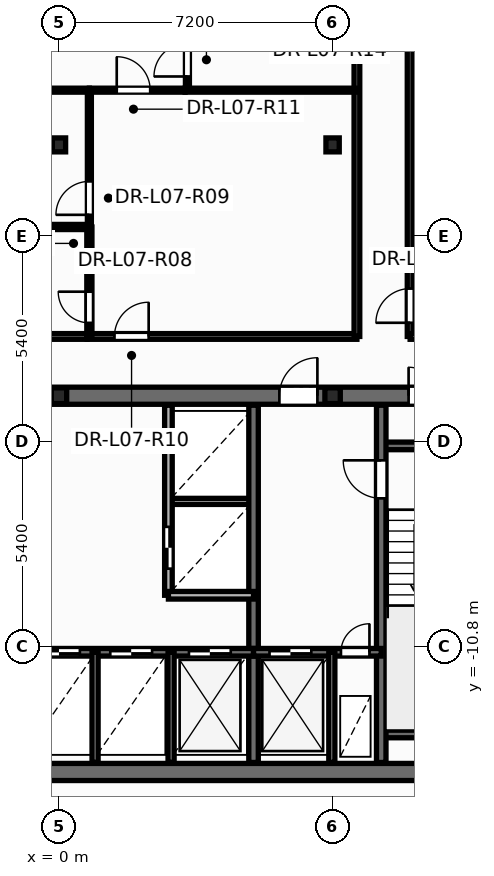
"""IFC4 building model, lengths in metres.
Left out: names, types, materials, properties, quantities, classifications, styles, units other than length and angle.
Written with IfcOpenShell. Run it as: python <this file> out.ifc"""

import sys

from ifc_helpers import new_model, si_unit, direction, frame, frame_2d, origin, origin_2d, place, context, subcontext, project, spatial, rectangle, i_section, extrude, element, fill, save


model = new_model("IFC4")
c1 = context("Model", 3, precision=1e-05, world=origin(), true_north=direction((0.0, 1.0)))
c2 = subcontext(c1, "Body", "Model", "MODEL_VIEW")
j1 = project(units=[si_unit("LENGTHUNIT", "METRE"), si_unit("PLANEANGLEUNIT", "RADIAN")], contexts=[c1])
p1 = place(None, origin())
s1 = spatial("IfcSite", under=j1, at=p1, CompositionType="ELEMENT")
p2 = place(p1, origin())
s2 = spatial("IfcBuilding", under=s1, at=p2, CompositionType="ELEMENT")
p3 = place(p2, frame((0.0, 0.0, 31.5)))
s3 = spatial("IfcBuildingStorey", under=s2, at=p3, CompositionType="ELEMENT", Elevation=31.5)
for number, where, z_axis, x_axis in (
    (1, (0.0, -4.2, 0.0), (0.0, 0.0, 1.0), (1.0, 0.0, 0.0)),
    (2, (7.2, -4.2, 0.0), (0.0, 0.0, 1.0), (1.0, 0.0, 0.0)),
):
    element("IfcColumn", number, at=place(p3, frame(where, z_axis=z_axis, x_axis=x_axis)), inside=s3, PredefinedType="PILASTER", context=c2, shape_type="SweptSolid", body=[
        extrude(i_section(OverallWidth=0.405, OverallDepth=0.414, WebThickness=0.022, FlangeThickness=0.032, at=origin_2d()), origin(), (0.0, 0.0, 1.0), 3.6),
    ])
for number, where, z_axis, x_axis in (
    (3, (0.0, 2.4, 0.0), (0.0, 0.0, 1.0), (1.0, 0.0, 0.0)),
    (4, (7.2, 2.4, 0.0), (0.0, 0.0, 1.0), (1.0, 0.0, 0.0)),
):
    element("IfcColumn", number, at=place(p3, frame(where, z_axis=z_axis, x_axis=x_axis)), inside=s3, PredefinedType="COLUMN", context=c2, shape_type="SweptSolid", body=[
        extrude(i_section(OverallWidth=0.35, OverallDepth=0.367, WebThickness=0.025, FlangeThickness=0.032, at=origin_2d()), origin(), (0.0, 0.0, 1.0), 3.6),
    ])
p4 = place(p3, frame((2.88, -6.98, 0.0), z_axis=(0.0, 0.0, 1.0), x_axis=(1.0, 0.0, 0.0)))
e5 = element("IfcWall", 5, at=p4, inside=s3, PredefinedType="PARTITIONING", context=c2, shape_type="SweptSolid", body=[
    extrude(rectangle(XDim=2.24, YDim=0.16, at=frame_2d((1.12, 0.0))), origin(), (0.0, 0.0, 1.0), 3.35),
])
p5 = place(p3, frame((-12.65, -14.1, 0.0), z_axis=(0.0, 0.0, 1.0), x_axis=(1.0, 0.0, 0.0)))
e6 = element("IfcWall", 6, at=p5, inside=s3, PredefinedType="SHEAR", context=c2, shape_type="SweptSolid", body=[
    extrude(rectangle(XDim=25.3, YDim=0.45, at=frame_2d((12.65, 0.0))), origin(), (0.0, 0.0, 1.0), 3.6),
])
p6 = place(p3, frame((-12.65, -4.2, 0.0), z_axis=(0.0, 0.0, 1.0), x_axis=(1.0, 0.0, 0.0)))
e7 = element("IfcWall", 7, at=p6, inside=s3, PredefinedType="SHEAR", context=c2, shape_type="SweptSolid", body=[
    extrude(rectangle(XDim=25.3, YDim=0.45, at=frame_2d((12.65, 0.0))), origin(), (0.0, 0.0, 1.0), 3.6),
])
p7 = place(p6, frame((1.85, 0.0, 0.0)))
e8 = element("IfcOpeningElement", 8, at=p7, cuts=e7, PredefinedType="OPENING", context=c2, shape_type="SweptSolid", body=[
    extrude(rectangle(XDim=0.756, YDim=2.054, at=frame_2d((0.375, 1.027))), frame((0.0, 0.235, 0.0), z_axis=(0.0, -1.0, 0.0), x_axis=(1.0, 0.0, 0.0)), (0.0, 0.0, 1.0), 0.47),
])
p8 = place(p6, frame((21.85, 0.0, 0.0)))
e9 = element("IfcOpeningElement", 9, at=p8, cuts=e7, PredefinedType="OPENING", context=c2, shape_type="SweptSolid", body=[
    extrude(rectangle(XDim=0.756, YDim=2.054, at=frame_2d((0.375, 1.027))), frame((0.0, 0.235, 0.0), z_axis=(0.0, -1.0, 0.0), x_axis=(1.0, 0.0, 0.0)), (0.0, 0.0, 1.0), 0.47),
])
p9 = place(p6, frame((23.5, 0.0, 0.0)))
e10 = element("IfcOpeningElement", 10, at=p9, cuts=e7, PredefinedType="OPENING", context=c2, shape_type="SweptSolid", body=[
    extrude(rectangle(XDim=0.756, YDim=2.054, at=frame_2d((0.375, 1.027))), frame((0.0, 0.235, 0.0), z_axis=(0.0, -1.0, 0.0), x_axis=(1.0, 0.0, 0.0)), (0.0, 0.0, 1.0), 0.47),
])
p10 = place(p6, frame((5.85, 0.0, 0.0)))
e11 = element("IfcOpeningElement", 11, at=p10, cuts=e7, PredefinedType="OPENING", context=c2, shape_type="SweptSolid", body=[
    extrude(rectangle(XDim=1.006, YDim=2.104, at=frame_2d((0.5, 1.052))), frame((0.0, 0.235, 0.0), z_axis=(0.0, -1.0, 0.0), x_axis=(1.0, 0.0, 0.0)), (0.0, 0.0, 1.0), 0.47),
])
p11 = place(p6, frame((10.35, 0.0, 0.0)))
e12 = element("IfcOpeningElement", 12, at=p11, cuts=e7, PredefinedType="OPENING", context=c2, shape_type="SweptSolid", body=[
    extrude(rectangle(XDim=1.406, YDim=2.154, at=frame_2d((0.7, 1.077))), frame((0.0, 0.235, 0.0), z_axis=(0.0, -1.0, 0.0), x_axis=(1.0, 0.0, 0.0)), (0.0, 0.0, 1.0), 0.47),
])
p12 = place(p6, frame((18.45, 0.0, 0.0)))
e13 = element("IfcOpeningElement", 13, at=p12, cuts=e7, PredefinedType="OPENING", context=c2, shape_type="SweptSolid", body=[
    extrude(rectangle(XDim=1.006, YDim=2.104, at=frame_2d((0.5, 1.052))), frame((0.0, 0.235, 0.0), z_axis=(0.0, -1.0, 0.0), x_axis=(1.0, 0.0, 0.0)), (0.0, 0.0, 1.0), 0.47),
])
for number, where, z_axis, x_axis in (
    (14, (8.48, -5.52, 0.0), (0.0, 0.0, 1.0), (1.0, 0.0, 0.0)),
    (15, (8.48, -13.1, 0.0), (0.0, 0.0, 1.0), (1.0, 0.0, 0.0)),
):
    element("IfcWall", number, at=place(p3, frame(where, z_axis=z_axis, x_axis=x_axis)), inside=s3, PredefinedType="SOLIDWALL", context=c2, shape_type="SweptSolid", body=[
        extrude(rectangle(XDim=3.87, YDim=0.2, at=frame_2d((1.935, 0.0))), origin(), (0.0, 0.0, 1.0), 3.6),
    ])
p13 = place(p3, frame((8.48, -13.85, 0.0), z_axis=(0.0, 0.0, 1.0), x_axis=(0.0, 1.0, 0.0)))
e16 = element("IfcWall", 16, at=p13, inside=s3, PredefinedType="SHEAR", context=c2, shape_type="SweptSolid", body=[
    extrude(rectangle(XDim=9.4, YDim=0.25, at=frame_2d((4.7, 0.0))), origin(), (0.0, 0.0, 1.0), 3.6),
])
p14 = place(p13, frame((6.95, 0.0, 0.0)))
e17 = element("IfcOpeningElement", 17, at=p14, cuts=e16, PredefinedType="OPENING", context=c2, shape_type="SweptSolid", body=[
    extrude(rectangle(XDim=1.006, YDim=2.104, at=frame_2d((0.5, 1.052))), frame((0.0, 0.135, 0.0), z_axis=(0.0, -1.0, 0.0), x_axis=(1.0, 0.0, 0.0)), (0.0, 0.0, 1.0), 0.27),
])
p15 = place(p3, frame((5.12, -13.85, 0.0), z_axis=(0.0, 0.0, 1.0), x_axis=(0.0, 1.0, 0.0)))
e18 = element("IfcWall", 18, at=p15, inside=s3, PredefinedType="SHEAR", context=c2, shape_type="SweptSolid", body=[
    extrude(rectangle(XDim=9.4, YDim=0.25, at=frame_2d((4.7, 0.0))), origin(), (0.0, 0.0, 1.0), 3.6),
])
p16 = place(p3, frame((-5.12, -10.95, 0.0), z_axis=(0.0, 0.0, 1.0), x_axis=(1.0, 0.0, 0.0)))
e19 = element("IfcWall", 19, at=p16, inside=s3, PredefinedType="SOLIDWALL", context=c2, shape_type="SweptSolid", body=[
    extrude(rectangle(XDim=10.24, YDim=0.2, at=frame_2d((5.12, 0.0))), origin(), (0.0, 0.0, 1.0), 3.6),
])
p17 = place(p16, frame((0.6, 0.0, 0.0)))
e20 = element("IfcOpeningElement", 20, at=p17, cuts=e19, PredefinedType="OPENING", context=c2, shape_type="SweptSolid", body=[
    extrude(rectangle(XDim=1.106, YDim=2.104, at=frame_2d((0.55, 1.052))), frame((0.0, 0.11, 0.0), z_axis=(0.0, -1.0, 0.0), x_axis=(1.0, 0.0, 0.0)), (0.0, 0.0, 1.0), 0.22),
])
p18 = place(p16, frame((2.67, 0.0, 0.0)))
e21 = element("IfcOpeningElement", 21, at=p18, cuts=e19, PredefinedType="OPENING", context=c2, shape_type="SweptSolid", body=[
    extrude(rectangle(XDim=1.106, YDim=2.104, at=frame_2d((0.55, 1.052))), frame((0.0, 0.11, 0.0), z_axis=(0.0, -1.0, 0.0), x_axis=(1.0, 0.0, 0.0)), (0.0, 0.0, 1.0), 0.22),
])
p19 = place(p16, frame((4.57, 0.0, 0.0)))
e22 = element("IfcOpeningElement", 22, at=p19, cuts=e19, PredefinedType="OPENING", context=c2, shape_type="SweptSolid", body=[
    extrude(rectangle(XDim=1.106, YDim=2.104, at=frame_2d((0.55, 1.052))), frame((0.0, 0.11, 0.0), z_axis=(0.0, -1.0, 0.0), x_axis=(1.0, 0.0, 0.0)), (0.0, 0.0, 1.0), 0.22),
])
p20 = place(p16, frame((6.47, 0.0, 0.0)))
e23 = element("IfcOpeningElement", 23, at=p20, cuts=e19, PredefinedType="OPENING", context=c2, shape_type="SweptSolid", body=[
    extrude(rectangle(XDim=1.106, YDim=2.104, at=frame_2d((0.55, 1.052))), frame((0.0, 0.11, 0.0), z_axis=(0.0, -1.0, 0.0), x_axis=(1.0, 0.0, 0.0)), (0.0, 0.0, 1.0), 0.22),
])
p21 = place(p16, frame((8.54, 0.0, 0.0)))
e24 = element("IfcOpeningElement", 24, at=p21, cuts=e19, PredefinedType="OPENING", context=c2, shape_type="SweptSolid", body=[
    extrude(rectangle(XDim=1.106, YDim=2.104, at=frame_2d((0.55, 1.052))), frame((0.0, 0.11, 0.0), z_axis=(0.0, -1.0, 0.0), x_axis=(1.0, 0.0, 0.0)), (0.0, 0.0, 1.0), 0.22),
])
p22 = place(p3, frame((5.12, -10.95, 0.0), z_axis=(0.0, 0.0, 1.0), x_axis=(1.0, 0.0, 0.0)))
e25 = element("IfcWall", 25, at=p22, inside=s3, PredefinedType="SOLIDWALL", context=c2, shape_type="SweptSolid", body=[
    extrude(rectangle(XDim=3.36, YDim=0.2, at=frame_2d((1.68, 0.0))), origin(), (0.0, 0.0, 1.0), 3.6),
])
p23 = place(p22, frame((0.42, 0.0, 0.0)))
e26 = element("IfcOpeningElement", 26, at=p23, cuts=e25, PredefinedType="OPENING", context=c2, shape_type="SweptSolid", body=[
    extrude(rectangle(XDim=1.106, YDim=2.104, at=frame_2d((0.55, 1.052))), frame((0.0, 0.11, 0.0), z_axis=(0.0, -1.0, 0.0), x_axis=(1.0, 0.0, 0.0)), (0.0, 0.0, 1.0), 0.22),
])
p24 = place(p22, frame((2.3, 0.0, 0.0)))
e27 = element("IfcOpeningElement", 27, at=p24, cuts=e25, PredefinedType="OPENING", context=c2, shape_type="SweptSolid", body=[
    extrude(rectangle(XDim=0.756, YDim=2.054, at=frame_2d((0.375, 1.027))), frame((0.0, 0.11, 0.0), z_axis=(0.0, -1.0, 0.0), x_axis=(1.0, 0.0, 0.0)), (0.0, 0.0, 1.0), 0.22),
])
for number, where, z_axis, x_axis in (
    (28, (7.18, -13.85, 0.0), (0.0, 0.0, 1.0), (0.0, 1.0, 0.0)),
    (29, (2.95, -13.85, 0.0), (0.0, 0.0, 1.0), (0.0, 1.0, 0.0)),
):
    element("IfcWall", number, at=place(p3, frame(where, z_axis=z_axis, x_axis=x_axis)), inside=s3, PredefinedType="PARTITIONING", context=c2, shape_type="SweptSolid", body=[
        extrude(rectangle(XDim=2.9, YDim=0.16, at=frame_2d((1.45, 0.0))), origin(), (0.0, 0.0, 1.0), 2.375),
    ])
p25 = place(p3, frame((2.88, -9.45, 0.0), z_axis=(0.0, 0.0, 1.0), x_axis=(0.0, 1.0, 0.0)))
e30 = element("IfcWall", 30, at=p25, inside=s3, PredefinedType="SOLIDWALL", context=c2, shape_type="SweptSolid", body=[
    extrude(rectangle(XDim=5.0, YDim=0.2, at=frame_2d((2.5, 0.0))), origin(), (0.0, 0.0, 1.0), 3.35),
])
p26 = place(p25, frame((0.7, 0.0, 0.0)))
e31 = element("IfcOpeningElement", 31, at=p26, cuts=e30, PredefinedType="OPENING", context=c2, shape_type="SweptSolid", body=[
    extrude(rectangle(XDim=1.106, YDim=2.104, at=frame_2d((0.55, 1.052))), frame((0.0, 0.11, 0.0), z_axis=(0.0, -1.0, 0.0), x_axis=(1.0, 0.0, 0.0)), (0.0, 0.0, 1.0), 0.22),
])
p27 = place(p3, frame((2.88, -9.45, 0.0), z_axis=(0.0, 0.0, 1.0), x_axis=(1.0, 0.0, 0.0)))
e32 = element("IfcWall", 32, at=p27, inside=s3, PredefinedType="SOLIDWALL", context=c2, shape_type="SweptSolid", body=[
    extrude(rectangle(XDim=2.24, YDim=0.2, at=frame_2d((1.12, 0.0))), origin(), (0.0, 0.0, 1.0), 3.35),
])
p28 = place(p3, frame((0.95, -13.85, 0.0), z_axis=(0.0, 0.0, 1.0), x_axis=(0.0, 1.0, 0.0)))
e33 = element("IfcWall", 33, at=p28, inside=s3, PredefinedType="PARTITIONING", context=c2, shape_type="SweptSolid", body=[
    extrude(rectangle(XDim=2.9, YDim=0.16, at=frame_2d((1.45, 0.0))), origin(), (0.0, 0.0, 1.0), 2.375),
])
p29 = place(p3, frame((9.24, -2.64, 0.0), z_axis=(0.0, 0.0, 1.0), x_axis=(0.0, 1.0, 0.0)))
e34 = element("IfcWall", 34, at=p29, inside=s3, PredefinedType="PARTITIONING", context=c2, shape_type="SweptSolid", body=[
    extrude(rectangle(XDim=8.84, YDim=0.15, at=frame_2d((4.42, 0.0))), origin(), (0.0, 0.0, 1.0), 2.509),
])
p30 = place(p29, frame((0.359, 0.0, 0.0)))
e35 = element("IfcOpeningElement", 35, at=p30, cuts=e34, PredefinedType="OPENING", context=c2, shape_type="SweptSolid", body=[
    extrude(rectangle(XDim=0.906, YDim=2.104, at=frame_2d((0.45, 1.052))), frame((0.0, 0.085, 0.0), z_axis=(0.0, -1.0, 0.0), x_axis=(1.0, 0.0, 0.0)), (0.0, 0.0, 1.0), 0.17),
])
p31 = place(p3, frame((0.74, -2.64, 0.0), z_axis=(0.0, 0.0, 1.0), x_axis=(1.0, 0.0, 0.0)))
e36 = element("IfcWall", 36, at=p31, inside=s3, PredefinedType="PARTITIONING", context=c2, shape_type="SweptSolid", body=[
    extrude(rectangle(XDim=7.1, YDim=0.15, at=frame_2d((3.55, 0.0))), origin(), (0.0, 0.0, 1.0), 2.325),
])
p32 = place(p31, frame((0.72, 0.0, 0.0)))
e37 = element("IfcOpeningElement", 37, at=p32, cuts=e36, PredefinedType="OPENING", context=c2, shape_type="SweptSolid", body=[
    extrude(rectangle(XDim=0.906, YDim=2.104, at=frame_2d((0.45, 1.052))), frame((0.0, 0.085, 0.0), z_axis=(0.0, -1.0, 0.0), x_axis=(1.0, 0.0, 0.0)), (0.0, 0.0, 1.0), 0.17),
])
p33 = place(p3, frame((7.84, -2.64, 0.0), z_axis=(0.0, 0.0, 1.0), x_axis=(0.0, 1.0, 0.0)))
e38 = element("IfcWall", 38, at=p33, inside=s3, PredefinedType="PARTITIONING", context=c2, shape_type="SweptSolid", body=[
    extrude(rectangle(XDim=8.84, YDim=0.15, at=frame_2d((4.42, 0.0))), origin(), (0.0, 0.0, 1.0), 2.509),
])
p34 = place(p3, frame((-7.84, -2.64, 0.0), z_axis=(0.0, 0.0, 1.0), x_axis=(1.0, 0.0, 0.0)))
e39 = element("IfcWall", 39, at=p34, inside=s3, PredefinedType="PARTITIONING", context=c2, shape_type="SweptSolid", body=[
    extrude(rectangle(XDim=8.578, YDim=0.15, at=frame_2d((4.289, 0.0))), origin(), (0.0, 0.0, 1.0), 2.325),
])
p35 = place(p3, frame((3.32, 3.84, 0.0), z_axis=(0.0, 0.0, 1.0), x_axis=(1.0, 0.0, 0.0)))
e40 = element("IfcWall", 40, at=p35, inside=s3, PredefinedType="PARTITIONING", context=c2, shape_type="SweptSolid", body=[
    extrude(rectangle(XDim=4.52, YDim=0.105, at=frame_2d((2.26, 0.0))), origin(), (0.0, 0.0, 1.0), 2.509),
])
p36 = place(p3, frame((3.38, 3.84, 0.0), z_axis=(0.0, 0.0, 1.0), x_axis=(0.0, 1.0, 0.0)))
e41 = element("IfcWall", 41, at=p36, inside=s3, PredefinedType="PARTITIONING", context=c2, shape_type="SweptSolid", body=[
    extrude(rectangle(XDim=3.76, YDim=0.105, at=frame_2d((1.88, 0.0))), origin(), (0.0, 0.0, 1.0), 3.35),
])
p37 = place(p36, frame((0.36, 0.0, 0.0)))
e42 = element("IfcOpeningElement", 42, at=p37, cuts=e41, PredefinedType="OPENING", context=c2, shape_type="SweptSolid", body=[
    extrude(rectangle(XDim=0.886, YDim=2.104, at=frame_2d((0.44, 1.052))), frame((0.0, 0.062, 0.0), z_axis=(0.0, -1.0, 0.0), x_axis=(1.0, 0.0, 0.0)), (0.0, 0.0, 1.0), 0.125),
])
p38 = place(p3, frame((0.8, 0.24, 0.0), z_axis=(0.0, 0.0, 1.0), x_axis=(0.0, 1.0, 0.0)))
e43 = element("IfcWall", 43, at=p38, inside=s3, PredefinedType="PARTITIONING", context=c2, shape_type="SweptSolid", body=[
    extrude(rectangle(XDim=3.6, YDim=0.105, at=frame_2d((1.8, 0.0))), origin(), (0.0, 0.0, 1.0), 2.325),
])
p39 = place(p38, frame((0.32, 0.0, 0.0)))
e44 = element("IfcOpeningElement", 44, at=p39, cuts=e43, PredefinedType="OPENING", context=c2, shape_type="SweptSolid", body=[
    extrude(rectangle(XDim=0.886, YDim=2.104, at=frame_2d((0.44, 1.052))), frame((0.0, 0.062, 0.0), z_axis=(0.0, -1.0, 0.0), x_axis=(1.0, 0.0, 0.0)), (0.0, 0.0, 1.0), 0.125),
])
p40 = place(p3, frame((9.24, -2.64, 0.0), z_axis=(0.0, 0.0, 1.0), x_axis=(1.0, 0.0, 0.0)))
e45 = element("IfcWall", 45, at=p40, inside=s3, PredefinedType="PARTITIONING", context=c2, shape_type="SweptSolid", body=[
    extrude(rectangle(XDim=3.26, YDim=0.15, at=frame_2d((1.63, 0.0))), origin(), (0.0, 0.0, 1.0), 3.35),
])
p41 = place(p3, frame((0.8, -2.64, 0.0), z_axis=(0.0, 0.0, 1.0), x_axis=(0.0, 1.0, 0.0)))
e46 = element("IfcWall", 46, at=p41, inside=s3, PredefinedType="PARTITIONING", context=c2, shape_type="SweptSolid", body=[
    extrude(rectangle(XDim=2.88, YDim=0.135, at=frame_2d((1.44, 0.0))), origin(), (0.0, 0.0, 1.0), 3.35),
])
p42 = place(p41, frame((0.357, 0.0, 0.0)))
e47 = element("IfcOpeningElement", 47, at=p42, cuts=e46, PredefinedType="OPENING", context=c2, shape_type="SweptSolid", body=[
    extrude(rectangle(XDim=0.826, YDim=2.104, at=frame_2d((0.41, 1.052))), frame((0.0, 0.078, 0.0), z_axis=(0.0, -1.0, 0.0), x_axis=(1.0, 0.0, 0.0)), (0.0, 0.0, 1.0), 0.155),
])
p43 = place(p3, frame((0.8, 3.84, 0.0), z_axis=(0.0, 0.0, 1.0), x_axis=(1.0, 0.0, 0.0)))
e48 = element("IfcWall", 48, at=p43, inside=s3, PredefinedType="PARTITIONING", context=c2, shape_type="SweptSolid", body=[
    extrude(rectangle(XDim=2.518, YDim=0.105, at=frame_2d((1.259, 0.0))), origin(), (0.0, 0.0, 1.0), 2.919),
])
p44 = place(p43, frame((0.72, 0.0, 0.0)))
e49 = element("IfcOpeningElement", 49, at=p44, cuts=e48, PredefinedType="OPENING", context=c2, shape_type="SweptSolid", body=[
    extrude(rectangle(XDim=0.886, YDim=2.104, at=frame_2d((0.44, 1.052))), frame((0.0, 0.062, 0.0), z_axis=(0.0, -1.0, 0.0), x_axis=(1.0, 0.0, 0.0)), (0.0, 0.0, 1.0), 0.125),
])
p45 = place(p3, frame((-1.8, 0.24, 0.0), z_axis=(0.0, 0.0, 1.0), x_axis=(1.0, 0.0, 0.0)))
e50 = element("IfcWall", 50, at=p45, inside=s3, PredefinedType="PARTITIONING", context=c2, shape_type="SweptSolid", body=[
    extrude(rectangle(XDim=2.6, YDim=0.135, at=frame_2d((1.3, 0.0))), origin(), (0.0, 0.0, 1.0), 2.325),
])
p46 = place(p3, frame((-1.8, 3.84, 0.0), z_axis=(0.0, 0.0, 1.0), x_axis=(1.0, 0.0, 0.0)))
e51 = element("IfcWall", 51, at=p46, inside=s3, PredefinedType="PARTITIONING", context=c2, shape_type="SweptSolid", body=[
    extrude(rectangle(XDim=2.6, YDim=0.105, at=frame_2d((1.3, 0.0))), origin(), (0.0, 0.0, 1.0), 2.325),
])
p47 = place(p26, origin())
e52 = element("IfcDoor", 52, at=p47, inside=s3, OperationType="DOUBLE_DOOR_SLIDING", PredefinedType="DOOR", context=c2, shape_type="SweptSolid", body=[
    extrude(rectangle(XDim=1.1, YDim=2.1, at=frame_2d((0.55, 1.05))), frame((0.0, 0.025, 0.0), z_axis=(0.0, -1.0, 0.0), x_axis=(1.0, 0.0, 0.0)), (0.0, 0.0, 1.0), 0.05),
])
fill(e31, e52)
p48 = place(p14, origin())
e53 = element("IfcDoor", 53, at=p48, inside=s3, OperationType="SINGLE_SWING_RIGHT", PredefinedType="DOOR", context=c2, shape_type="SweptSolid", body=[
    extrude(rectangle(XDim=1.0, YDim=2.1, at=frame_2d((0.5, 1.05))), frame((0.0, 0.025, 0.0), z_axis=(0.0, -1.0, 0.0), x_axis=(1.0, 0.0, 0.0)), (0.0, 0.0, 1.0), 0.05),
])
fill(e17, e53)
p49 = place(p23, origin())
e54 = element("IfcDoor", 54, at=p49, inside=s3, OperationType="DOUBLE_DOOR_SLIDING", PredefinedType="DOOR", context=c2, shape_type="SweptSolid", body=[
    extrude(rectangle(XDim=1.1, YDim=2.1, at=frame_2d((0.55, 1.05))), frame((0.0, 0.025, 0.0), z_axis=(0.0, -1.0, 0.0), x_axis=(1.0, 0.0, 0.0)), (0.0, 0.0, 1.0), 0.05),
])
fill(e26, e54)
p50 = place(p24, origin())
e55 = element("IfcDoor", 55, at=p50, inside=s3, OperationType="SINGLE_SWING_RIGHT", PredefinedType="DOOR", context=c2, shape_type="SweptSolid", body=[
    extrude(rectangle(XDim=0.75, YDim=2.05, at=frame_2d((0.375, 1.025))), frame((0.0, 0.025, 0.0), z_axis=(0.0, -1.0, 0.0), x_axis=(1.0, 0.0, 0.0)), (0.0, 0.0, 1.0), 0.05),
])
fill(e27, e55)
p51 = place(p19, origin())
e56 = element("IfcDoor", 56, at=p51, inside=s3, OperationType="DOUBLE_DOOR_SLIDING", PredefinedType="DOOR", context=c2, shape_type="SweptSolid", body=[
    extrude(rectangle(XDim=1.1, YDim=2.1, at=frame_2d((0.55, 1.05))), frame((0.0, 0.025, 0.0), z_axis=(0.0, -1.0, 0.0), x_axis=(1.0, 0.0, 0.0)), (0.0, 0.0, 1.0), 0.05),
])
fill(e22, e56)
p52 = place(p20, origin())
e57 = element("IfcDoor", 57, at=p52, inside=s3, OperationType="DOUBLE_DOOR_SLIDING", PredefinedType="DOOR", context=c2, shape_type="SweptSolid", body=[
    extrude(rectangle(XDim=1.1, YDim=2.1, at=frame_2d((0.55, 1.05))), frame((0.0, 0.025, 0.0), z_axis=(0.0, -1.0, 0.0), x_axis=(1.0, 0.0, 0.0)), (0.0, 0.0, 1.0), 0.05),
])
fill(e23, e57)
p53 = place(p21, origin())
e58 = element("IfcDoor", 58, at=p53, inside=s3, OperationType="DOUBLE_DOOR_SLIDING", PredefinedType="DOOR", context=c2, shape_type="SweptSolid", body=[
    extrude(rectangle(XDim=1.1, YDim=2.1, at=frame_2d((0.55, 1.05))), frame((0.0, 0.025, 0.0), z_axis=(0.0, -1.0, 0.0), x_axis=(1.0, 0.0, 0.0)), (0.0, 0.0, 1.0), 0.05),
])
fill(e24, e58)
p54 = place(p8, origin())
e59 = element("IfcDoor", 59, at=p54, inside=s3, OperationType="SINGLE_SWING_LEFT", PredefinedType="DOOR", context=c2, shape_type="SweptSolid", body=[
    extrude(rectangle(XDim=0.75, YDim=2.05, at=frame_2d((0.375, 1.025))), frame((0.0, 0.025, 0.0), z_axis=(0.0, -1.0, 0.0), x_axis=(1.0, 0.0, 0.0)), (0.0, 0.0, 1.0), 0.05),
])
fill(e9, e59)
p55 = place(p12, origin())
e60 = element("IfcDoor", 60, at=p55, inside=s3, OperationType="SINGLE_SWING_RIGHT", PredefinedType="DOOR", context=c2, shape_type="SweptSolid", body=[
    extrude(rectangle(XDim=1.0, YDim=2.1, at=frame_2d((0.5, 1.05))), frame((0.0, 0.025, 0.0), z_axis=(0.0, -1.0, 0.0), x_axis=(1.0, 0.0, 0.0)), (0.0, 0.0, 1.0), 0.05),
])
fill(e13, e60)
p56 = place(p42, origin())
e61 = element("IfcDoor", 61, at=p56, inside=s3, OperationType="SINGLE_SWING_RIGHT", PredefinedType="DOOR", context=c2, shape_type="SweptSolid", body=[
    extrude(rectangle(XDim=0.82, YDim=2.1, at=frame_2d((0.41, 1.05))), frame((0.0, 0.025, 0.0), z_axis=(0.0, -1.0, 0.0), x_axis=(1.0, 0.0, 0.0)), (0.0, 0.0, 1.0), 0.05),
])
fill(e47, e61)
p57 = place(p39, origin())
e62 = element("IfcDoor", 62, at=p57, inside=s3, OperationType="SINGLE_SWING_LEFT", PredefinedType="DOOR", context=c2, shape_type="SweptSolid", body=[
    extrude(rectangle(XDim=0.88, YDim=2.1, at=frame_2d((0.44, 1.05))), frame((0.0, 0.025, 0.0), z_axis=(0.0, -1.0, 0.0), x_axis=(1.0, 0.0, 0.0)), (0.0, 0.0, 1.0), 0.05),
])
fill(e44, e62)
p58 = place(p32, origin())
e63 = element("IfcDoor", 63, at=p58, inside=s3, OperationType="SINGLE_SWING_RIGHT", PredefinedType="DOOR", context=c2, shape_type="SweptSolid", body=[
    extrude(rectangle(XDim=0.9, YDim=2.1, at=frame_2d((0.45, 1.05))), frame((0.0, 0.025, 0.0), z_axis=(0.0, -1.0, 0.0), x_axis=(1.0, 0.0, 0.0)), (0.0, 0.0, 1.0), 0.05),
])
fill(e37, e63)
p59 = place(p44, origin())
e64 = element("IfcDoor", 64, at=p59, inside=s3, OperationType="SINGLE_SWING_LEFT", PredefinedType="DOOR", context=c2, shape_type="SweptSolid", body=[
    extrude(rectangle(XDim=0.88, YDim=2.1, at=frame_2d((0.44, 1.05))), frame((0.0, 0.025, 0.0), z_axis=(0.0, -1.0, 0.0), x_axis=(1.0, 0.0, 0.0)), (0.0, 0.0, 1.0), 0.05),
])
fill(e49, e64)
p60 = place(p37, origin())
e65 = element("IfcDoor", 65, at=p60, inside=s3, OperationType="SINGLE_SWING_LEFT", PredefinedType="DOOR", context=c2, shape_type="SweptSolid", body=[
    extrude(rectangle(XDim=0.88, YDim=2.1, at=frame_2d((0.44, 1.05))), frame((0.0, 0.025, 0.0), z_axis=(0.0, -1.0, 0.0), x_axis=(1.0, 0.0, 0.0)), (0.0, 0.0, 1.0), 0.05),
])
fill(e42, e65)
p61 = place(p30, origin())
e66 = element("IfcDoor", 66, at=p61, inside=s3, OperationType="SINGLE_SWING_LEFT", PredefinedType="DOOR", context=c2, shape_type="SweptSolid", body=[
    extrude(rectangle(XDim=0.9, YDim=2.1, at=frame_2d((0.45, 1.05))), frame((0.0, 0.025, 0.0), z_axis=(0.0, -1.0, 0.0), x_axis=(1.0, 0.0, 0.0)), (0.0, 0.0, 1.0), 0.05),
])
fill(e35, e66)
save(model, sys.argv[1])
